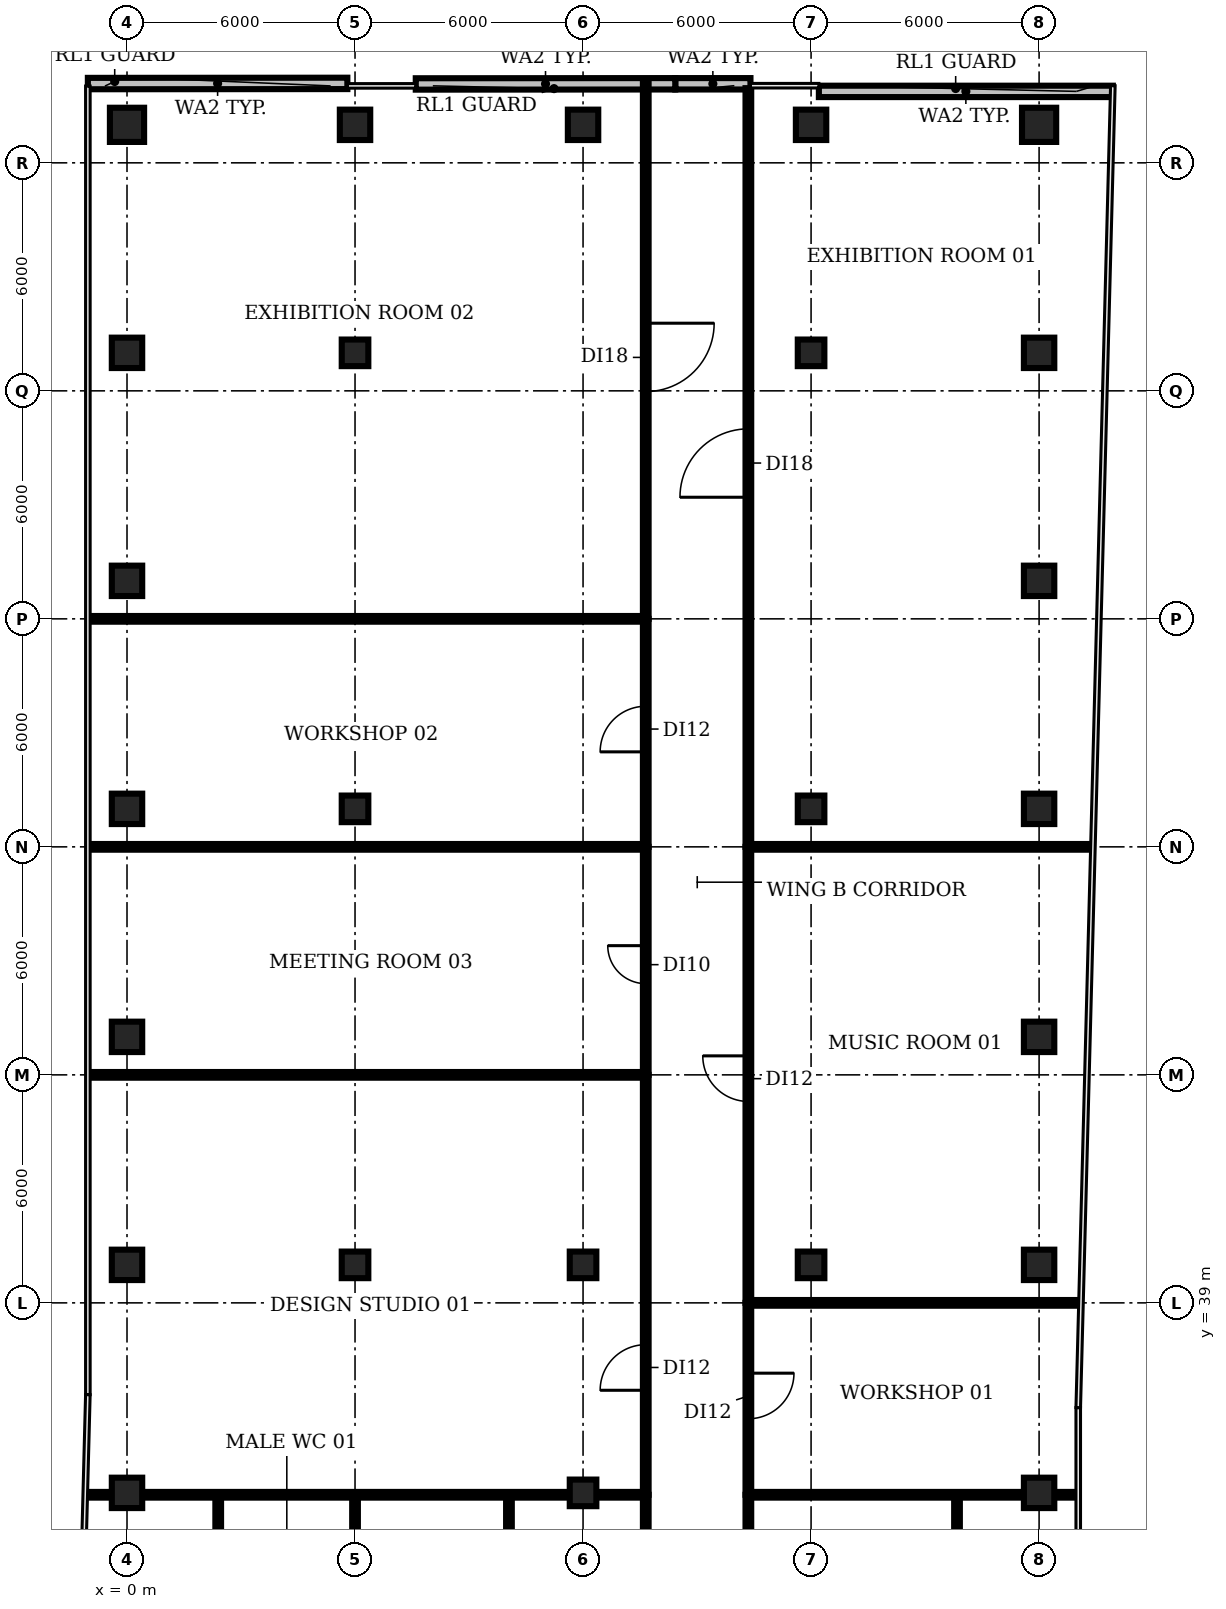
"""IFC4 building model, lengths in metres.
Left out: names, types, materials, properties, quantities, classifications, styles, units other than length and angle.
Written with IfcOpenShell. Run it as: python <this file> out.ifc"""

import sys

from ifc_helpers import new_model, si_unit, direction, frame, frame_2d, origin, origin_2d, place, context, subcontext, project, spatial, rectangle, circle, extrude, element, fill, save


model = new_model("IFC4")
c1 = context("Model", 3, precision=1e-05, world=origin(), true_north=direction((0.0, 1.0)))
c2 = subcontext(c1, "Body", "Model", "MODEL_VIEW")
j1 = project(units=[si_unit("LENGTHUNIT", "METRE"), si_unit("PLANEANGLEUNIT", "RADIAN")], contexts=[c1])
p1 = place(None, origin())
s1 = spatial("IfcSite", under=j1, at=p1, CompositionType="ELEMENT")
p2 = place(p1, origin())
s2 = spatial("IfcBuilding", under=s1, at=p2, CompositionType="ELEMENT")
p3 = place(p2, frame((0.0, 0.0, 234.8)))
s3 = spatial("IfcBuildingStorey", under=s2, at=p3, CompositionType="ELEMENT", Elevation=234.8)
for number, where, z_axis, x_axis in (
    (1, (0.0, 34.0, 0.0), (0.0, 0.0, 1.0), (1.0, 0.0, 0.0)),
    (2, (0.0, 40.0, 0.0), (0.0, 0.0, 1.0), (1.0, 0.0, 0.0)),
    (3, (0.0, 46.0, 0.0), (0.0, 0.0, 1.0), (1.0, 0.0, 0.0)),
    (4, (0.0, 52.0, 0.0), (0.0, 0.0, 1.0), (1.0, 0.0, 0.0)),
    (5, (0.0, 58.0, 0.0), (0.0, 0.0, 1.0), (1.0, 0.0, 0.0)),
    (6, (0.0, 64.0, 0.0), (0.0, 0.0, 1.0), (1.0, 0.0, 0.0)),
):
    element("IfcColumn", number, at=place(p3, frame(where, z_axis=z_axis, x_axis=x_axis)), inside=s3, PredefinedType="COLUMN", context=c2, shape_type="SweptSolid", body=[
        extrude(rectangle(XDim=0.8, YDim=0.8, at=origin_2d()), origin(), (0.0, 0.0, 1.0), 3.85),
    ])
p4 = place(p3, frame((0.0, 70.0, 0.0), z_axis=(0.0, 0.0, 1.0), x_axis=(1.0, 0.0, 0.0)))
e7 = element("IfcColumn", 7, at=p4, inside=s3, PredefinedType="COLUMN", context=c2, shape_type="SweptSolid", body=[
    extrude(circle(Radius=0.45, at=origin_2d()), origin(), (0.0, 0.0, 1.0), 3.85),
])
for number, where, z_axis, x_axis in (
    (8, (6.0, 40.0, 0.0), (0.0, 0.0, 1.0), (1.0, 0.0, 0.0)),
    (9, (6.0, 52.0, 0.0), (0.0, 0.0, 1.0), (1.0, 0.0, 0.0)),
    (10, (6.0, 64.0, 0.0), (0.0, 0.0, 1.0), (1.0, 0.0, 0.0)),
):
    element("IfcColumn", number, at=place(p3, frame(where, z_axis=z_axis, x_axis=x_axis)), inside=s3, PredefinedType="COLUMN", context=c2, shape_type="SweptSolid", body=[
        extrude(rectangle(XDim=0.7, YDim=0.7, at=origin_2d()), origin(), (0.0, 0.0, 1.0), 3.85),
    ])
p5 = place(p3, frame((6.0, 70.0, 0.0), z_axis=(0.0, 0.0, 1.0), x_axis=(1.0, 0.0, 0.0)))
e11 = element("IfcColumn", 11, at=p5, inside=s3, PredefinedType="COLUMN", context=c2, shape_type="SweptSolid", body=[
    extrude(rectangle(XDim=0.8, YDim=0.8, at=origin_2d()), origin(), (0.0, 0.0, 1.0), 3.85),
])
for number, where, z_axis, x_axis in (
    (12, (12.0, 34.0, 0.0), (0.0, 0.0, 1.0), (1.0, 0.0, 0.0)),
    (13, (12.0, 40.0, 0.0), (0.0, 0.0, 1.0), (1.0, 0.0, 0.0)),
):
    element("IfcColumn", number, at=place(p3, frame(where, z_axis=z_axis, x_axis=x_axis)), inside=s3, PredefinedType="COLUMN", context=c2, shape_type="SweptSolid", body=[
        extrude(rectangle(XDim=0.7, YDim=0.7, at=origin_2d()), origin(), (0.0, 0.0, 1.0), 3.85),
    ])
p6 = place(p3, frame((12.0, 70.0, 0.0), z_axis=(0.0, 0.0, 1.0), x_axis=(1.0, 0.0, 0.0)))
e14 = element("IfcColumn", 14, at=p6, inside=s3, PredefinedType="COLUMN", context=c2, shape_type="SweptSolid", body=[
    extrude(rectangle(XDim=0.8, YDim=0.8, at=origin_2d()), origin(), (0.0, 0.0, 1.0), 3.85),
])
for number, where, z_axis, x_axis in (
    (15, (18.0, 40.0, 0.0), (0.0, 0.0, 1.0), (1.0, 0.0, 0.0)),
    (16, (18.0, 52.0, 0.0), (0.0, 0.0, 1.0), (1.0, 0.0, 0.0)),
    (17, (18.0, 64.0, 0.0), (0.0, 0.0, 1.0), (1.0, 0.0, 0.0)),
):
    element("IfcColumn", number, at=place(p3, frame(where, z_axis=z_axis, x_axis=x_axis)), inside=s3, PredefinedType="COLUMN", context=c2, shape_type="SweptSolid", body=[
        extrude(rectangle(XDim=0.7, YDim=0.7, at=origin_2d()), origin(), (0.0, 0.0, 1.0), 3.85),
    ])
for number, where, z_axis, x_axis in (
    (18, (18.0, 70.0, 0.0), (0.0, 0.0, 1.0), (1.0, 0.0, 0.0)),
    (19, (24.0, 34.0, 0.0), (0.0, 0.0, 1.0), (1.0, 0.0, 0.0)),
    (20, (24.0, 40.0, 0.0), (0.0, 0.0, 1.0), (1.0, 0.0, 0.0)),
    (21, (24.0, 46.0, 0.0), (0.0, 0.0, 1.0), (1.0, 0.0, 0.0)),
    (22, (24.0, 52.0, 0.0), (0.0, 0.0, 1.0), (1.0, 0.0, 0.0)),
    (23, (24.0, 58.0, 0.0), (0.0, 0.0, 1.0), (1.0, 0.0, 0.0)),
    (24, (24.0, 64.0, 0.0), (0.0, 0.0, 1.0), (1.0, 0.0, 0.0)),
):
    element("IfcColumn", number, at=place(p3, frame(where, z_axis=z_axis, x_axis=x_axis)), inside=s3, PredefinedType="COLUMN", context=c2, shape_type="SweptSolid", body=[
        extrude(rectangle(XDim=0.8, YDim=0.8, at=origin_2d()), origin(), (0.0, 0.0, 1.0), 3.85),
    ])
p7 = place(p3, frame((24.0, 70.0, 0.0), z_axis=(0.0, 0.0, 1.0), x_axis=(1.0, 0.0, 0.0)))
e25 = element("IfcColumn", 25, at=p7, inside=s3, PredefinedType="COLUMN", context=c2, shape_type="SweptSolid", body=[
    extrude(circle(Radius=0.45, at=origin_2d()), origin(), (0.0, 0.0, 1.0), 3.85),
])
p8 = place(p3, frame((25.941, 70.88, 0.0), z_axis=(0.0, 0.0, 1.0), x_axis=(-1.0, 0.0, 0.0)))
e26 = element("IfcWall", 26, at=p8, inside=s3, PredefinedType="SOLIDWALL", context=c2, shape_type="SweptSolid", body=[
    extrude(rectangle(XDim=7.736, YDim=0.3, at=frame_2d((3.868, 0.0))), origin(), (0.0, 0.0, 1.0), 3.85),
])
p9 = place(p3, frame((16.405, 71.08, 0.0), z_axis=(0.0, 0.0, 1.0), x_axis=(-1.0, 0.0, 0.0)))
e27 = element("IfcWall", 27, at=p9, inside=s3, PredefinedType="SOLIDWALL", context=c2, shape_type="SweptSolid", body=[
    extrude(rectangle(XDim=1.979, YDim=0.3, at=frame_2d((0.989, 0.0))), origin(), (0.0, 0.0, 1.0), 3.85),
])
p10 = place(p3, frame((14.427, 71.08, 0.0), z_axis=(0.0, 0.0, 1.0), x_axis=(-0.999999792909, -0.000643569533, 0.0)))
e28 = element("IfcWall", 28, at=p10, inside=s3, PredefinedType="SOLIDWALL", context=c2, shape_type="SweptSolid", body=[
    extrude(rectangle(XDim=6.828, YDim=0.3, at=frame_2d((3.414, 0.0))), origin(), (0.0, 0.0, 1.0), 3.85),
])
p11 = place(p3, frame((5.798, 71.091, 0.0), z_axis=(0.0, 0.0, 1.0), x_axis=(-0.999999792894, -0.000643592544, 0.0)))
e29 = element("IfcWall", 29, at=p11, inside=s3, PredefinedType="SOLIDWALL", context=c2, shape_type="SweptSolid", body=[
    extrude(rectangle(XDim=6.828, YDim=0.3, at=frame_2d((3.414, 0.0))), origin(), (0.0, 0.0, 1.0), 3.85),
])
p12 = place(p3, frame((-1.05, 33.95, 0.0), z_axis=(0.0, 0.0, 1.0), x_axis=(1.0, 0.0, 0.0)))
e30 = element("IfcWall", 30, at=p12, inside=s3, PredefinedType="PARTITIONING", context=c2, shape_type="SweptSolid", body=[
    extrude(rectangle(XDim=14.7, YDim=0.15, at=frame_2d((7.35, 0.0))), origin(), (0.0, 0.0, 1.0), 2.88),
])
for number, where, z_axis, x_axis in (
    (31, (-0.98, 45.0, 0.0), (0.0, 0.0, 1.0), (1.0, 0.0, 0.0)),
    (32, (-0.98, 51.0, 0.0), (0.0, 0.0, 1.0), (1.0, 0.0, 0.0)),
    (33, (-0.98, 57.0, 0.0), (0.0, 0.0, 1.0), (1.0, 0.0, 0.0)),
):
    element("IfcWall", number, at=place(p3, frame(where, z_axis=z_axis, x_axis=x_axis)), inside=s3, PredefinedType="PARTITIONING", context=c2, shape_type="SweptSolid", body=[
        extrude(rectangle(XDim=14.63, YDim=0.15, at=frame_2d((7.315, 0.0))), origin(), (0.0, 0.0, 1.0), 2.88),
    ])
p13 = place(p3, frame((2.4, 27.95, 0.0), z_axis=(0.0, 0.0, 1.0), x_axis=(0.0, 1.0, 0.0)))
e34 = element("IfcWall", 34, at=p13, inside=s3, PredefinedType="PARTITIONING", context=c2, shape_type="SweptSolid", body=[
    extrude(rectangle(XDim=6.0, YDim=0.15, at=frame_2d((3.0, 0.0))), origin(), (0.0, 0.0, 1.0), 2.88),
])
p14 = place(p3, frame((6.0, 28.0, 0.0), z_axis=(0.0, 0.0, 1.0), x_axis=(0.0, 1.0, 0.0)))
e35 = element("IfcWall", 35, at=p14, inside=s3, PredefinedType="PARTITIONING", context=c2, shape_type="SweptSolid", body=[
    extrude(rectangle(XDim=5.95, YDim=0.15, at=frame_2d((2.975, 0.0))), origin(), (0.0, 0.0, 1.0), 2.88),
])
p15 = place(p3, frame((10.05, 29.15, 0.0), z_axis=(0.0, 0.0, 1.0), x_axis=(0.0, 1.0, 0.0)))
e36 = element("IfcWall", 36, at=p15, inside=s3, PredefinedType="PARTITIONING", context=c2, shape_type="SweptSolid", body=[
    extrude(rectangle(XDim=4.8, YDim=0.15, at=frame_2d((2.4, 0.0))), origin(), (0.0, 0.0, 1.0), 2.88),
])
p16 = place(p3, frame((13.65, 29.15, 0.0), z_axis=(0.0, 0.0, 1.0), x_axis=(0.0, 1.0, 0.0)))
e37 = element("IfcWall", 37, at=p16, inside=s3, PredefinedType="PARTITIONING", context=c2, shape_type="SweptSolid", body=[
    extrude(rectangle(XDim=4.8, YDim=0.15, at=frame_2d((2.4, 0.0))), origin(), (0.0, 0.0, 1.0), 2.88),
])
p17 = place(p16, frame((1.6, 0.0, 0.0)))
e38 = element("IfcOpeningElement", 38, at=p17, cuts=e37, PredefinedType="OPENING", context=c2, shape_type="SweptSolid", body=[
    extrude(rectangle(XDim=0.9, YDim=2.1, at=frame_2d((0.45, 1.05))), frame((0.0, 0.085, 0.0), z_axis=(0.0, -1.0, 0.0), x_axis=(1.0, 0.0, 0.0)), (0.0, 0.0, 1.0), 0.17),
])
p18 = place(p3, frame((13.65, 33.95, 0.0), z_axis=(0.0, 0.0, 1.0), x_axis=(0.0, 1.0, 0.0)))
e39 = element("IfcWall", 39, at=p18, inside=s3, PredefinedType="PARTITIONING", context=c2, shape_type="SweptSolid", body=[
    extrude(rectangle(XDim=11.05, YDim=0.15, at=frame_2d((5.525, 0.0))), origin(), (0.0, 0.0, 1.0), 2.88),
])
p19 = place(p18, frame((2.75, 0.0, 0.0)))
e40 = element("IfcOpeningElement", 40, at=p19, cuts=e39, PredefinedType="OPENING", context=c2, shape_type="SweptSolid", body=[
    extrude(rectangle(XDim=1.2, YDim=2.1, at=frame_2d((0.6, 1.05))), frame((0.0, 0.085, 0.0), z_axis=(0.0, -1.0, 0.0), x_axis=(1.0, 0.0, 0.0)), (0.0, 0.0, 1.0), 0.17),
])
p20 = place(p3, frame((13.65, 45.0, 0.0), z_axis=(0.0, 0.0, 1.0), x_axis=(0.0, 1.0, 0.0)))
e41 = element("IfcWall", 41, at=p20, inside=s3, PredefinedType="PARTITIONING", context=c2, shape_type="SweptSolid", body=[
    extrude(rectangle(XDim=6.0, YDim=0.15, at=frame_2d((3.0, 0.0))), origin(), (0.0, 0.0, 1.0), 2.88),
])
p21 = place(p20, frame((2.4, 0.0, 0.0)))
e42 = element("IfcOpeningElement", 42, at=p21, cuts=e41, PredefinedType="OPENING", context=c2, shape_type="SweptSolid", body=[
    extrude(rectangle(XDim=1.0, YDim=2.1, at=frame_2d((0.5, 1.05))), frame((0.0, 0.085, 0.0), z_axis=(0.0, -1.0, 0.0), x_axis=(1.0, 0.0, 0.0)), (0.0, 0.0, 1.0), 0.17),
])
p22 = place(p3, frame((13.65, 51.0, 0.0), z_axis=(0.0, 0.0, 1.0), x_axis=(0.0, 1.0, 0.0)))
e43 = element("IfcWall", 43, at=p22, inside=s3, PredefinedType="PARTITIONING", context=c2, shape_type="SweptSolid", body=[
    extrude(rectangle(XDim=6.0, YDim=0.15, at=frame_2d((3.0, 0.0))), origin(), (0.0, 0.0, 1.0), 2.88),
])
p23 = place(p22, frame((2.5, 0.0, 0.0)))
e44 = element("IfcOpeningElement", 44, at=p23, cuts=e43, PredefinedType="OPENING", context=c2, shape_type="SweptSolid", body=[
    extrude(rectangle(XDim=1.2, YDim=2.1, at=frame_2d((0.6, 1.05))), frame((0.0, 0.085, 0.0), z_axis=(0.0, -1.0, 0.0), x_axis=(1.0, 0.0, 0.0)), (0.0, 0.0, 1.0), 0.17),
])
p24 = place(p3, frame((13.65, 71.09, 0.0), z_axis=(0.0, 0.0, 1.0), x_axis=(0.0, -1.0, 0.0)))
e45 = element("IfcWall", 45, at=p24, inside=s3, PredefinedType="PARTITIONING", context=c2, shape_type="SweptSolid", body=[
    extrude(rectangle(XDim=14.09, YDim=0.15, at=frame_2d((7.045, 0.0))), origin(), (0.0, 0.0, 1.0), 2.88),
])
p25 = place(p24, frame((6.31, 0.0, 0.0)))
e46 = element("IfcOpeningElement", 46, at=p25, cuts=e45, PredefinedType="OPENING", context=c2, shape_type="SweptSolid", body=[
    extrude(rectangle(XDim=1.8, YDim=2.1, at=frame_2d((0.9, 1.05))), frame((0.0, 0.085, 0.0), z_axis=(0.0, -1.0, 0.0), x_axis=(1.0, 0.0, 0.0)), (0.0, 0.0, 1.0), 0.17),
])
p26 = place(p3, frame((16.35, 29.15, 0.0), z_axis=(0.0, 0.0, 1.0), x_axis=(0.0, 1.0, 0.0)))
e47 = element("IfcWall", 47, at=p26, inside=s3, PredefinedType="PARTITIONING", context=c2, shape_type="SweptSolid", body=[
    extrude(rectangle(XDim=4.8, YDim=0.15, at=frame_2d((2.4, 0.0))), origin(), (0.0, 0.0, 1.0), 2.88),
])
p27 = place(p3, frame((16.35, 33.95, 0.0), z_axis=(0.0, 0.0, 1.0), x_axis=(1.0, 0.0, 0.0)))
e48 = element("IfcWall", 48, at=p27, inside=s3, PredefinedType="PARTITIONING", context=c2, shape_type="SweptSolid", body=[
    extrude(rectangle(XDim=8.63, YDim=0.15, at=frame_2d((4.315, 0.0))), origin(), (0.0, 0.0, 1.0), 2.88),
])
p28 = place(p3, frame((16.35, 39.0, 0.0), z_axis=(0.0, 0.0, 1.0), x_axis=(0.0, -1.0, 0.0)))
e49 = element("IfcWall", 49, at=p28, inside=s3, PredefinedType="PARTITIONING", context=c2, shape_type="SweptSolid", body=[
    extrude(rectangle(XDim=5.05, YDim=0.15, at=frame_2d((2.525, 0.0))), origin(), (0.0, 0.0, 1.0), 2.88),
])
p29 = place(p28, frame((1.85, 0.0, 0.0)))
e50 = element("IfcOpeningElement", 50, at=p29, cuts=e49, PredefinedType="OPENING", context=c2, shape_type="SweptSolid", body=[
    extrude(rectangle(XDim=1.2, YDim=2.1, at=frame_2d((0.6, 1.05))), frame((0.0, 0.085, 0.0), z_axis=(0.0, -1.0, 0.0), x_axis=(1.0, 0.0, 0.0)), (0.0, 0.0, 1.0), 0.17),
])
p30 = place(p3, frame((16.35, 39.0, 0.0), z_axis=(0.0, 0.0, 1.0), x_axis=(0.0, 1.0, 0.0)))
e51 = element("IfcWall", 51, at=p30, inside=s3, PredefinedType="PARTITIONING", context=c2, shape_type="SweptSolid", body=[
    extrude(rectangle(XDim=12.0, YDim=0.15, at=frame_2d((6.0, 0.0))), origin(), (0.0, 0.0, 1.0), 2.88),
])
p31 = place(p30, frame((5.3, 0.0, 0.0)))
e52 = element("IfcOpeningElement", 52, at=p31, cuts=e51, PredefinedType="OPENING", context=c2, shape_type="SweptSolid", body=[
    extrude(rectangle(XDim=1.2, YDim=2.1, at=frame_2d((0.6, 1.05))), frame((0.0, 0.085, 0.0), z_axis=(0.0, -1.0, 0.0), x_axis=(1.0, 0.0, 0.0)), (0.0, 0.0, 1.0), 0.17),
])
p32 = place(p3, frame((16.35, 39.0, 0.0), z_axis=(0.0, 0.0, 1.0), x_axis=(1.0, 0.0, 0.0)))
e53 = element("IfcWall", 53, at=p32, inside=s3, PredefinedType="PARTITIONING", context=c2, shape_type="SweptSolid", body=[
    extrude(rectangle(XDim=8.7, YDim=0.15, at=frame_2d((4.35, 0.0))), origin(), (0.0, 0.0, 1.0), 2.88),
])
p33 = place(p3, frame((16.35, 51.0, 0.0), z_axis=(0.0, 0.0, 1.0), x_axis=(0.0, 1.0, 0.0)))
e54 = element("IfcWall", 54, at=p33, inside=s3, PredefinedType="PARTITIONING", context=c2, shape_type="SweptSolid", body=[
    extrude(rectangle(XDim=19.965, YDim=0.15, at=frame_2d((9.982, 0.0))), origin(), (0.0, 0.0, 1.0), 2.88),
])
p34 = place(p33, frame((9.2, 0.0, 0.0)))
e55 = element("IfcOpeningElement", 55, at=p34, cuts=e54, PredefinedType="OPENING", context=c2, shape_type="SweptSolid", body=[
    extrude(rectangle(XDim=1.8, YDim=2.1, at=frame_2d((0.9, 1.05))), frame((0.0, 0.085, 0.0), z_axis=(0.0, -1.0, 0.0), x_axis=(1.0, 0.0, 0.0)), (0.0, 0.0, 1.0), 0.17),
])
p35 = place(p3, frame((16.35, 51.0, 0.0), z_axis=(0.0, 0.0, 1.0), x_axis=(1.0, 0.0, 0.0)))
e56 = element("IfcWall", 56, at=p35, inside=s3, PredefinedType="PARTITIONING", context=c2, shape_type="SweptSolid", body=[
    extrude(rectangle(XDim=9.02, YDim=0.15, at=frame_2d((4.51, 0.0))), origin(), (0.0, 0.0, 1.0), 2.88),
])
p36 = place(p3, frame((21.84, 29.15, 0.0), z_axis=(0.0, 0.0, 1.0), x_axis=(0.0, 1.0, 0.0)))
e57 = element("IfcWall", 57, at=p36, inside=s3, PredefinedType="PARTITIONING", context=c2, shape_type="SweptSolid", body=[
    extrude(rectangle(XDim=4.8, YDim=0.15, at=frame_2d((2.4, 0.0))), origin(), (0.0, 0.0, 1.0), 2.88),
])
p37 = place(p19, origin())
e58 = element("IfcDoor", 58, at=p37, inside=s3, OperationType="SINGLE_SWING_LEFT", PredefinedType="DOOR", context=c2, shape_type="SweptSolid", body=[
    extrude(rectangle(XDim=1.2, YDim=2.1, at=frame_2d((0.6, 1.05))), frame((0.0, 0.025, 0.0), z_axis=(0.0, -1.0, 0.0), x_axis=(1.0, 0.0, 0.0)), (0.0, 0.0, 1.0), 0.05),
])
fill(e40, e58)
p38 = place(p21, origin())
e59 = element("IfcDoor", 59, at=p38, inside=s3, OperationType="SINGLE_SWING_RIGHT", PredefinedType="DOOR", context=c2, shape_type="SweptSolid", body=[
    extrude(rectangle(XDim=1.0, YDim=2.1, at=frame_2d((0.5, 1.05))), frame((0.0, 0.025, 0.0), z_axis=(0.0, -1.0, 0.0), x_axis=(1.0, 0.0, 0.0)), (0.0, 0.0, 1.0), 0.05),
])
fill(e42, e59)
p39 = place(p23, origin())
e60 = element("IfcDoor", 60, at=p39, inside=s3, OperationType="SINGLE_SWING_LEFT", PredefinedType="DOOR", context=c2, shape_type="SweptSolid", body=[
    extrude(rectangle(XDim=1.2, YDim=2.1, at=frame_2d((0.6, 1.05))), frame((0.0, 0.025, 0.0), z_axis=(0.0, -1.0, 0.0), x_axis=(1.0, 0.0, 0.0)), (0.0, 0.0, 1.0), 0.05),
])
fill(e44, e60)
p40 = place(p25, origin())
e61 = element("IfcDoor", 61, at=p40, inside=s3, OperationType="SINGLE_SWING_LEFT", PredefinedType="DOOR", context=c2, shape_type="SweptSolid", body=[
    extrude(rectangle(XDim=1.8, YDim=2.1, at=frame_2d((0.9, 1.05))), frame((0.0, 0.025, 0.0), z_axis=(0.0, -1.0, 0.0), x_axis=(1.0, 0.0, 0.0)), (0.0, 0.0, 1.0), 0.05),
])
fill(e46, e61)
p41 = place(p29, origin())
e62 = element("IfcDoor", 62, at=p41, inside=s3, OperationType="SINGLE_SWING_LEFT", PredefinedType="DOOR", context=c2, shape_type="SweptSolid", body=[
    extrude(rectangle(XDim=1.2, YDim=2.1, at=frame_2d((0.6, 1.05))), frame((0.0, 0.025, 0.0), z_axis=(0.0, -1.0, 0.0), x_axis=(1.0, 0.0, 0.0)), (0.0, 0.0, 1.0), 0.05),
])
fill(e50, e62)
p42 = place(p31, origin())
e63 = element("IfcDoor", 63, at=p42, inside=s3, OperationType="SINGLE_SWING_RIGHT", PredefinedType="DOOR", context=c2, shape_type="SweptSolid", body=[
    extrude(rectangle(XDim=1.2, YDim=2.1, at=frame_2d((0.6, 1.05))), frame((0.0, 0.025, 0.0), z_axis=(0.0, -1.0, 0.0), x_axis=(1.0, 0.0, 0.0)), (0.0, 0.0, 1.0), 0.05),
])
fill(e52, e63)
p43 = place(p34, origin())
e64 = element("IfcDoor", 64, at=p43, inside=s3, OperationType="SINGLE_SWING_LEFT", PredefinedType="DOOR", context=c2, shape_type="SweptSolid", body=[
    extrude(rectangle(XDim=1.8, YDim=2.1, at=frame_2d((0.9, 1.05))), frame((0.0, 0.025, 0.0), z_axis=(0.0, -1.0, 0.0), x_axis=(1.0, 0.0, 0.0)), (0.0, 0.0, 1.0), 0.05),
])
fill(e55, e64)
save(model, sys.argv[1])
